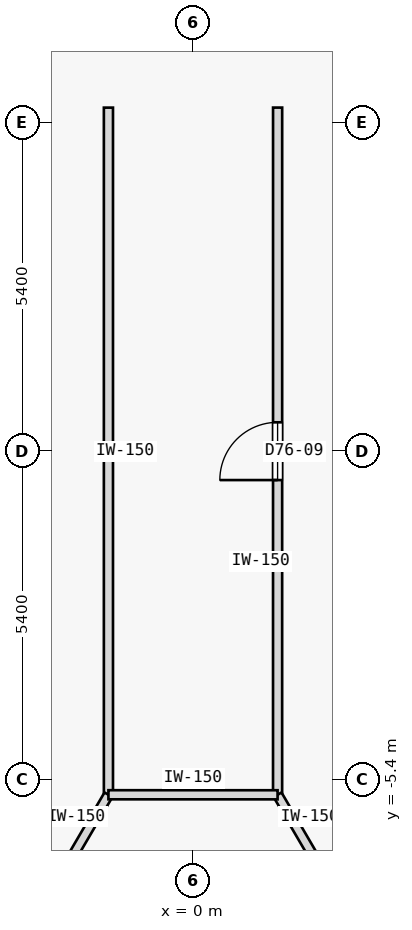
"""IFC4 building model, lengths in metres.
Left out: names, types, materials, properties, quantities, classifications, styles, units other than length and angle.
Written with IfcOpenShell. Run it as: python <this file> out.ifc"""

import sys

from ifc_helpers import new_model, si_unit, direction, frame, frame_2d, origin, place, context, subcontext, project, spatial, rectangle, extrude, element, fill, save


model = new_model("IFC4")
c1 = context("Model", 3, precision=1e-05, world=origin(), true_north=direction((0.0, 1.0)))
c2 = subcontext(c1, "Body", "Model", "MODEL_VIEW")
j1 = project(units=[si_unit("LENGTHUNIT", "METRE"), si_unit("PLANEANGLEUNIT", "RADIAN")], contexts=[c1])
p1 = place(None, origin())
s1 = spatial("IfcSite", under=j1, at=p1, CompositionType="ELEMENT")
p2 = place(p1, origin())
s2 = spatial("IfcBuilding", under=s1, at=p2, CompositionType="ELEMENT")
p3 = place(p2, frame((0.0, 0.0, 285.25)))
s3 = spatial("IfcBuildingStorey", under=s2, at=p3, CompositionType="ELEMENT", Elevation=285.25)
p4 = place(p3, frame((-1.391, -5.65, 0.0), z_axis=(0.0, 0.0, 1.0), x_axis=(-2.1605738e-05, 0.999999999767, 0.0)))
e1 = element("IfcWall", 1, at=p4, inside=s3, PredefinedType="PARTITIONING", context=c2, shape_type="SweptSolid", body=[
    extrude(rectangle(XDim=11.3, YDim=0.15, at=frame_2d((5.65, 0.0))), origin(), (0.0, 0.0, 1.0), 3.125),
])
p5 = place(p3, frame((1.391, -5.65, 0.0), z_axis=(0.0, 0.0, 1.0), x_axis=(4.3206809e-05, 0.999999999067, 0.0)))
e2 = element("IfcWall", 2, at=p5, inside=s3, PredefinedType="PARTITIONING", context=c2, shape_type="SweptSolid", body=[
    extrude(rectangle(XDim=11.301, YDim=0.15, at=frame_2d((5.65, 0.0))), origin(), (0.0, 0.0, 1.0), 3.125),
])
p6 = place(p5, frame((5.176, 0.0, 0.0)))
e3 = element("IfcOpeningElement", 3, at=p6, cuts=e2, PredefinedType="OPENING", context=c2, shape_type="SweptSolid", body=[
    extrude(rectangle(XDim=0.95, YDim=2.15, at=frame_2d((0.475, 1.075))), frame((0.0, 0.085, 0.0), z_axis=(0.0, -1.0, 0.0), x_axis=(1.0, 0.0, 0.0)), (0.0, 0.0, 1.0), 0.17),
])
p7 = place(p3, frame((-1.98, -6.658, 0.0), z_axis=(0.0, 0.0, 1.0), x_axis=(0.504651025514, 0.863323428645, 0.0)))
e4 = element("IfcWall", 4, at=p7, inside=s3, PredefinedType="PARTITIONING", context=c2, shape_type="SweptSolid", body=[
    extrude(rectangle(XDim=1.167, YDim=0.15, at=frame_2d((0.584, 0.0))), origin(), (0.0, 0.0, 1.0), 3.125),
])
p8 = place(p3, frame((1.391, -5.65, 0.0), z_axis=(0.0, 0.0, 1.0), x_axis=(0.504339173621, -0.863505644424, 0.0)))
e5 = element("IfcWall", 5, at=p8, inside=s3, PredefinedType="PARTITIONING", context=c2, shape_type="SweptSolid", body=[
    extrude(rectangle(XDim=1.167, YDim=0.15, at=frame_2d((0.583, 0.0))), origin(), (0.0, 0.0, 1.0), 3.125),
])
p9 = place(p3, frame((-1.391, -5.65, 0.0), z_axis=(0.0, 0.0, 1.0), x_axis=(0.999999984594, -0.000175530979, 0.0)))
e6 = element("IfcWall", 6, at=p9, inside=s3, PredefinedType="PARTITIONING", context=c2, shape_type="SweptSolid", body=[
    extrude(rectangle(XDim=2.782, YDim=0.15, at=frame_2d((1.391, 0.0))), origin(), (0.0, 0.0, 1.0), 3.125),
])
p10 = place(p6, origin())
e7 = element("IfcDoor", 7, at=p10, inside=s3, OperationType="SINGLE_SWING_LEFT", PredefinedType="DOOR", context=c2, shape_type="SweptSolid", body=[
    extrude(rectangle(XDim=0.95, YDim=2.15, at=frame_2d((0.475, 1.075))), frame((0.0, 0.025, 0.0), z_axis=(0.0, -1.0, 0.0), x_axis=(1.0, 0.0, 0.0)), (0.0, 0.0, 1.0), 0.05),
])
fill(e3, e7)
save(model, sys.argv[1])
